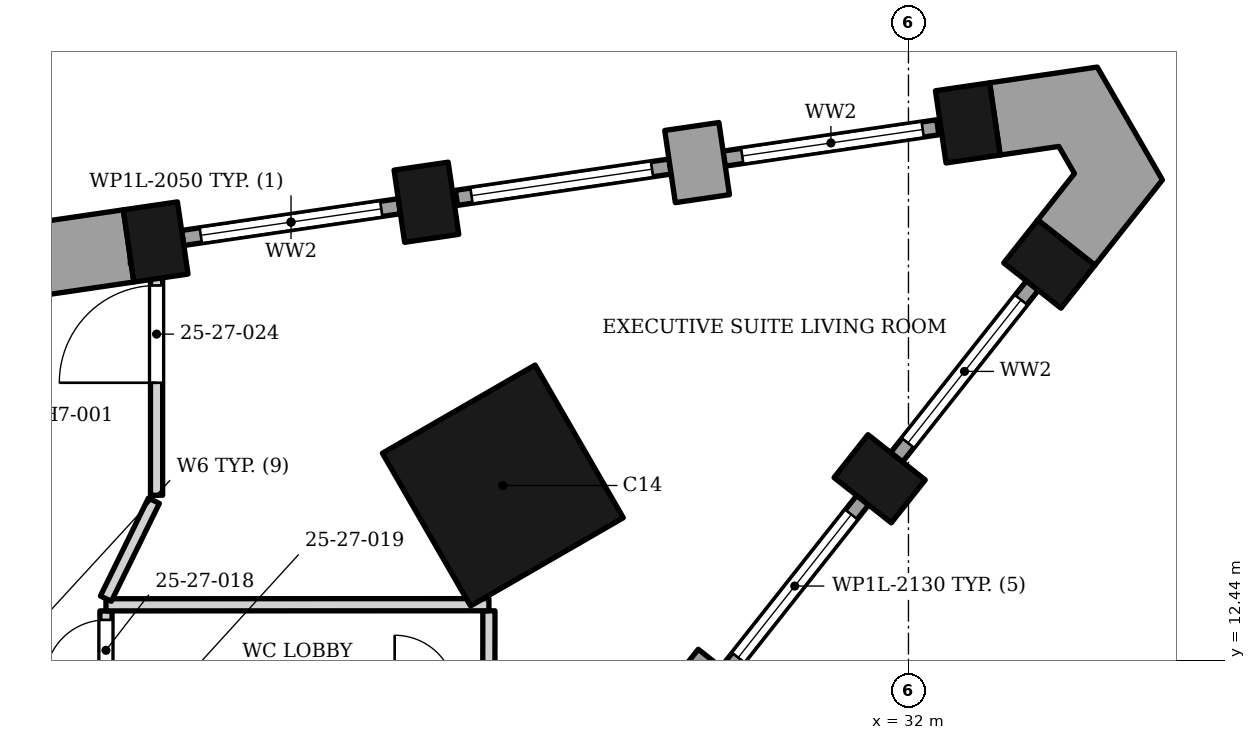
"""IFC4 building model, lengths in metres.
Left out: names, types, materials, properties, quantities, classifications, styles, units other than length and angle.
Written with IfcOpenShell. Run it as: python <this file> out.ifc"""

import sys

from ifc_helpers import new_model, si_unit, direction, frame, frame_2d, origin, origin_2d, place, context, subcontext, project, spatial, polyline, rectangle, outline, extrude, element, fill, save


model = new_model("IFC4")
c1 = context("Model", 3, precision=1e-05, world=origin(), true_north=direction((0.0, 1.0)))
c2 = subcontext(c1, "Body", "Model", "MODEL_VIEW")
j1 = project(units=[si_unit("LENGTHUNIT", "METRE"), si_unit("PLANEANGLEUNIT", "RADIAN")], contexts=[c1])
p1 = place(None, origin())
s1 = spatial("IfcSite", under=j1, at=p1, CompositionType="ELEMENT")
p2 = place(p1, origin())
s2 = spatial("IfcBuilding", under=s1, at=p2, CompositionType="ELEMENT")
p3 = place(p2, frame((0.0, 0.0, 112.2)))
s3 = spatial("IfcBuildingStorey", under=s2, at=p3, CompositionType="ELEMENT", Elevation=112.2)
p4 = place(p3, frame((25.329, 15.313, 0.0), z_axis=(0.0, 0.0, 1.0), x_axis=(-0.866025377604, -0.500000045345, 0.0)))
e1 = element("IfcColumn", 1, at=p4, inside=s3, PredefinedType="COLUMN", context=c2, shape_type="SweptSolid", body=[
    extrude(rectangle(XDim=2.9, YDim=2.9, at=origin_2d()), origin(), (0.0, 0.0, 1.0), 3.4),
])
for number, where, z_axis, x_axis in (
    (2, (31.526, 15.424, 0.0), (0.0, 0.0, 1.0), (0.62, 0.784, 0.0)),
    (3, (34.317, 18.954, 0.0), (0.0, 0.0, 1.0), (0.62, 0.784, 0.0)),
    (4, (32.976, 21.276, 0.0), (0.0, 0.0, 1.0), (-0.989, -0.145, 0.0)),
    (5, (24.072, 19.971, 0.0), (0.0, 0.0, 1.0), (-0.989, -0.145, 0.0)),
    (6, (19.619, 19.318, 0.0), (0.0, 0.0, 1.0), (-0.989, -0.145, 0.0)),
):
    element("IfcColumn", number, at=place(p3, frame(where, z_axis=z_axis, x_axis=x_axis)), inside=s3, PredefinedType="COLUMN", context=c2, shape_type="SweptSolid", body=[
        extrude(rectangle(XDim=0.9, YDim=1.2, at=origin_2d()), origin(), (0.0, 0.0, 1.0), 3.4),
    ])
p5 = place(p3, frame((29.205, 11.522, 0.0), z_axis=(0.0, 0.0, 1.0), x_axis=(-0.784330409431, 0.620343299184, 0.0)))
e7 = element("IfcWall", 7, at=p5, inside=s3, PredefinedType="SOLIDWALL", context=c2, shape_type="SweptSolid", body=[
    extrude(rectangle(XDim=1.2, YDim=0.9, at=frame_2d((0.6, 0.0))), origin(), (0.0, 0.0, 1.0), 2.63),
])
p6 = place(p3, frame((29.013, 12.248, 0.0), z_axis=(0.0, 0.0, 1.0), x_axis=(0.620310302622, 0.784356505972, 0.0)))
e8 = element("IfcWall", 8, at=p6, inside=s3, PredefinedType="ELEMENTEDWALL", context=c2, shape_type="SweptSolid", body=[
    extrude(rectangle(XDim=3.6, YDim=0.25, at=frame_2d((1.8, 0.0))), origin(), (0.0, 0.0, 1.0), 2.63),
])
p7 = place(p6, frame((0.3, 0.0, 0.3)))
e9 = element("IfcOpeningElement", 9, at=p7, cuts=e8, PredefinedType="OPENING", context=c2, shape_type="SweptSolid", body=[
    extrude(rectangle(XDim=3.0, YDim=2.13, at=frame_2d((1.5, 1.065))), frame((0.0, 0.135, 0.0), z_axis=(0.0, -1.0, 0.0), x_axis=(1.0, 0.0, 0.0)), (0.0, 0.0, 1.0), 0.27),
])
p8 = place(p3, frame((31.805, 15.777, 0.0), z_axis=(0.0, 0.0, 1.0), x_axis=(0.620301575857, 0.784363407477, 0.0)))
e10 = element("IfcWall", 10, at=p8, inside=s3, PredefinedType="ELEMENTEDWALL", context=c2, shape_type="SweptSolid", body=[
    extrude(rectangle(XDim=3.6, YDim=0.25, at=frame_2d((1.8, 0.0))), origin(), (0.0, 0.0, 1.0), 2.63),
])
p9 = place(p8, frame((0.3, 0.0, 0.3)))
e11 = element("IfcOpeningElement", 11, at=p9, cuts=e10, PredefinedType="OPENING", context=c2, shape_type="SweptSolid", body=[
    extrude(rectangle(XDim=3.0, YDim=2.13, at=frame_2d((1.5, 1.065))), frame((0.0, 0.135, 0.0), z_axis=(0.0, -1.0, 0.0), x_axis=(1.0, 0.0, 0.0)), (0.0, 0.0, 1.0), 0.27),
])
p10 = place(p3, frame((28.437, 21.217, 0.0), z_axis=(0.0, 0.0, 1.0), x_axis=(0.145066385332, -0.989421924078, 0.0)))
e12 = element("IfcWall", 12, at=p10, inside=s3, PredefinedType="SOLIDWALL", context=c2, shape_type="SweptSolid", body=[
    extrude(rectangle(XDim=1.2, YDim=0.9, at=frame_2d((0.6, 0.0))), origin(), (0.0, 0.0, 1.0), 2.63),
])
p11 = place(p3, frame((32.482, 21.203, 0.0), z_axis=(0.0, 0.0, 1.0), x_axis=(-0.989427410985, -0.145028957081, 0.0)))
e13 = element("IfcWall", 13, at=p11, inside=s3, PredefinedType="ELEMENTEDWALL", context=c2, shape_type="SweptSolid", body=[
    extrude(rectangle(XDim=3.552, YDim=0.25, at=frame_2d((1.776, 0.0))), origin(), (0.0, 0.0, 1.0), 2.63),
])
p12 = place(p11, frame((0.25, 0.0, 0.3)))
e14 = element("IfcOpeningElement", 14, at=p12, cuts=e13, PredefinedType="OPENING", context=c2, shape_type="SweptSolid", body=[
    extrude(rectangle(XDim=3.0, YDim=2.13, at=frame_2d((1.5, 1.065))), frame((0.0, 0.135, 0.0), z_axis=(0.0, -1.0, 0.0), x_axis=(1.0, 0.0, 0.0)), (0.0, 0.0, 1.0), 0.27),
])
p13 = place(p3, frame((28.081, 20.558, 0.0), z_axis=(0.0, 0.0, 1.0), x_axis=(-0.989427410985, -0.145028957081, 0.0)))
e15 = element("IfcWall", 15, at=p13, inside=s3, PredefinedType="ELEMENTEDWALL", context=c2, shape_type="SweptSolid", body=[
    extrude(rectangle(XDim=3.552, YDim=0.25, at=frame_2d((1.776, 0.0))), origin(), (0.0, 0.0, 1.0), 2.63),
])
p14 = place(p13, frame((0.302, 0.0, 0.3)))
e16 = element("IfcOpeningElement", 16, at=p14, cuts=e15, PredefinedType="OPENING", context=c2, shape_type="SweptSolid", body=[
    extrude(rectangle(XDim=3.0, YDim=2.13, at=frame_2d((1.5, 1.065))), frame((0.0, 0.135, 0.0), z_axis=(0.0, -1.0, 0.0), x_axis=(1.0, 0.0, 0.0)), (0.0, 0.0, 1.0), 0.27),
])
p15 = place(p3, frame((23.626, 19.906, 0.0), z_axis=(0.0, 0.0, 1.0), x_axis=(-0.989431656237, -0.144999991846, 0.0)))
e17 = element("IfcWall", 17, at=p15, inside=s3, PredefinedType="ELEMENTEDWALL", context=c2, shape_type="SweptSolid", body=[
    extrude(rectangle(XDim=3.6, YDim=0.25, at=frame_2d((1.8, 0.0))), origin(), (0.0, 0.0, 1.0), 2.552),
])
p16 = place(p15, frame((0.3, 0.0, 0.3)))
e18 = element("IfcOpeningElement", 18, at=p16, cuts=e17, PredefinedType="OPENING", context=c2, shape_type="SweptSolid", body=[
    extrude(rectangle(XDim=3.0, YDim=2.05, at=frame_2d((1.5, 1.025))), frame((0.0, 0.135, 0.0), z_axis=(0.0, -1.0, 0.0), x_axis=(1.0, 0.0, 0.0)), (0.0, 0.0, 1.0), 0.27),
])
p17 = place(p3, origin())
e19 = element("IfcWall", 19, at=p17, inside=s3, PredefinedType="SOLIDWALL", context=c2, shape_type="SweptSolid", body=[
    extrude(outline(polyline([(35.067, 18.935), (36.177, 20.338), (35.105, 22.194), (33.335, 21.935), (33.509, 20.748), (34.473, 20.889), (34.73, 20.443), (34.125, 19.679), (35.067, 18.935)])), origin(), (0.0, 0.0, 1.0), 2.65),
])
p18 = place(p3, origin())
e20 = element("IfcWall", 20, at=p18, inside=s3, PredefinedType="SOLIDWALL", context=c2, shape_type="SweptSolid", body=[
    extrude(outline(polyline([(17.72, 19.646), (17.342, 19.052), (17.4, 19.052), (17.4, 18.656), (17.894, 18.459), (19.261, 18.659), (19.087, 19.847), (17.72, 19.646)])), origin(), (0.0, 0.0, 1.0), 2.65),
])
p19 = place(p3, frame((25.098, 11.902, 0.0), z_axis=(0.0, 0.0, 1.0), x_axis=(0.001085186556, 0.999999411185, 0.0)))
e21 = element("IfcWall", 21, at=p19, inside=s3, PredefinedType="PARTITIONING", context=c2, shape_type="SweptSolid", body=[
    extrude(rectangle(XDim=1.35, YDim=0.2, at=frame_2d((0.675, 0.0))), origin(), (0.0, 0.0, 1.0), 3.23),
])
p20 = place(p3, frame((18.8, 11.902, 0.0), z_axis=(0.0, 0.0, 1.0), x_axis=(0.001267655628, 0.999999196524, 0.0)))
e22 = element("IfcWall", 22, at=p20, inside=s3, PredefinedType="PARTITIONING", context=c2, shape_type="SweptSolid", body=[
    extrude(rectangle(XDim=1.348, YDim=0.2, at=frame_2d((0.674, 0.0))), origin(), (0.0, 0.0, 1.0), 3.23),
])
p21 = place(p20, frame((0.2, 0.0, 0.0)))
e23 = element("IfcOpeningElement", 23, at=p21, cuts=e22, PredefinedType="OPENING", context=c2, shape_type="SweptSolid", body=[
    extrude(rectangle(XDim=1.0, YDim=2.1, at=frame_2d((0.5, 1.05))), frame((0.0, 0.11, 0.0), z_axis=(0.0, -1.0, 0.0), x_axis=(1.0, 0.0, 0.0)), (0.0, 0.0, 1.0), 0.22),
])
p22 = place(p3, frame((18.802, 13.351, 0.0), z_axis=(0.0, 0.0, 1.0), x_axis=(0.999999963185, 0.000271349372, 0.0)))
e24 = element("IfcWall", 24, at=p22, inside=s3, PredefinedType="PARTITIONING", context=c2, shape_type="SweptSolid", body=[
    extrude(rectangle(XDim=6.298, YDim=0.2, at=frame_2d((3.149, 0.0))), origin(), (0.0, 0.0, 1.0), 3.23),
])
p23 = place(p3, frame((18.801, 13.452, 0.0), z_axis=(0.0, 0.0, 1.0), x_axis=(0.440230384159, 0.897884852786, 0.0)))
e25 = element("IfcWall", 25, at=p23, inside=s3, PredefinedType="PARTITIONING", context=c2, shape_type="SweptSolid", body=[
    extrude(rectangle(XDim=1.793, YDim=0.2, at=frame_2d((0.897, 0.0))), origin(), (0.0, 0.0, 1.0), 3.23),
])
p24 = place(p3, frame((19.634, 15.153, 0.0), z_axis=(0.0, 0.0, 1.0), x_axis=(0.0, 1.0, 0.0)))
e26 = element("IfcWall", 26, at=p24, inside=s3, PredefinedType="PARTITIONING", context=c2, shape_type="SweptSolid", body=[
    extrude(rectangle(XDim=3.9, YDim=0.2, at=frame_2d((1.95, 0.0))), origin(), (0.0, 0.0, 1.0), 3.23),
])
p25 = place(p24, frame((1.85, 0.0, 0.0)))
e27 = element("IfcOpeningElement", 27, at=p25, cuts=e26, PredefinedType="OPENING", context=c2, shape_type="SweptSolid", body=[
    extrude(rectangle(XDim=1.6, YDim=2.1, at=frame_2d((0.8, 1.05))), frame((0.0, 0.11, 0.0), z_axis=(0.0, -1.0, 0.0), x_axis=(1.0, 0.0, 0.0)), (0.0, 0.0, 1.0), 0.22),
])
p26 = place(p3, frame((19.203, 19.053, 0.0), z_axis=(0.0, 0.0, 1.0), x_axis=(0.999999728074, -0.000737462926, 0.0)))
e28 = element("IfcWall", 28, at=p26, inside=s3, PredefinedType="PARTITIONING", context=c2, shape_type="SweptSolid", body=[
    extrude(rectangle(XDim=0.331, YDim=0.2, at=frame_2d((0.166, 0.0))), origin(), (0.0, 0.0, 1.0), 3.23),
])
p27 = place(p7, origin())
e29 = element("IfcWindow", 29, at=p27, inside=s3, PartitioningType="SINGLE_PANEL", PredefinedType="WINDOW", context=c2, shape_type="SweptSolid", body=[
    extrude(rectangle(XDim=3.0, YDim=2.13, at=frame_2d((1.5, 1.065))), frame((0.0, 0.03, 0.0), z_axis=(0.0, -1.0, 0.0), x_axis=(1.0, 0.0, 0.0)), (0.0, 0.0, 1.0), 0.06),
])
fill(e9, e29)
p28 = place(p9, origin())
e30 = element("IfcWindow", 30, at=p28, inside=s3, PartitioningType="SINGLE_PANEL", PredefinedType="WINDOW", context=c2, shape_type="SweptSolid", body=[
    extrude(rectangle(XDim=3.0, YDim=2.13, at=frame_2d((1.5, 1.065))), frame((0.0, 0.03, 0.0), z_axis=(0.0, -1.0, 0.0), x_axis=(1.0, 0.0, 0.0)), (0.0, 0.0, 1.0), 0.06),
])
fill(e11, e30)
p29 = place(p12, origin())
e31 = element("IfcWindow", 31, at=p29, inside=s3, PartitioningType="SINGLE_PANEL", PredefinedType="WINDOW", context=c2, shape_type="SweptSolid", body=[
    extrude(rectangle(XDim=3.0, YDim=2.13, at=frame_2d((1.5, 1.065))), frame((0.0, 0.03, 0.0), z_axis=(0.0, -1.0, 0.0), x_axis=(1.0, 0.0, 0.0)), (0.0, 0.0, 1.0), 0.06),
])
fill(e14, e31)
p30 = place(p14, origin())
e32 = element("IfcWindow", 32, at=p30, inside=s3, PartitioningType="SINGLE_PANEL", PredefinedType="WINDOW", context=c2, shape_type="SweptSolid", body=[
    extrude(rectangle(XDim=3.0, YDim=2.13, at=frame_2d((1.5, 1.065))), frame((0.0, 0.03, 0.0), z_axis=(0.0, -1.0, 0.0), x_axis=(1.0, 0.0, 0.0)), (0.0, 0.0, 1.0), 0.06),
])
fill(e16, e32)
p31 = place(p16, origin())
e33 = element("IfcWindow", 33, at=p31, inside=s3, PartitioningType="SINGLE_PANEL", PredefinedType="WINDOW", context=c2, shape_type="SweptSolid", body=[
    extrude(rectangle(XDim=3.0, YDim=2.05, at=frame_2d((1.5, 1.025))), frame((0.0, 0.03, 0.0), z_axis=(0.0, -1.0, 0.0), x_axis=(1.0, 0.0, 0.0)), (0.0, 0.0, 1.0), 0.06),
])
fill(e18, e33)
p32 = place(p21, origin())
e34 = element("IfcDoor", 34, at=p32, inside=s3, OperationType="SINGLE_SWING_LEFT", PredefinedType="DOOR", context=c2, shape_type="SweptSolid", body=[
    extrude(rectangle(XDim=1.0, YDim=2.1, at=frame_2d((0.5, 1.05))), frame((0.0, 0.025, 0.0), z_axis=(0.0, -1.0, 0.0), x_axis=(1.0, 0.0, 0.0)), (0.0, 0.0, 1.0), 0.05),
])
fill(e23, e34)
p33 = place(p25, origin())
e35 = element("IfcDoor", 35, at=p33, inside=s3, OperationType="DOUBLE_DOOR_SINGLE_SWING", PredefinedType="DOOR", context=c2, shape_type="SweptSolid", body=[
    extrude(rectangle(XDim=1.6, YDim=2.1, at=frame_2d((0.8, 1.05))), frame((0.0, 0.025, 0.0), z_axis=(0.0, -1.0, 0.0), x_axis=(1.0, 0.0, 0.0)), (0.0, 0.0, 1.0), 0.05),
])
fill(e27, e35)
save(model, sys.argv[1])
